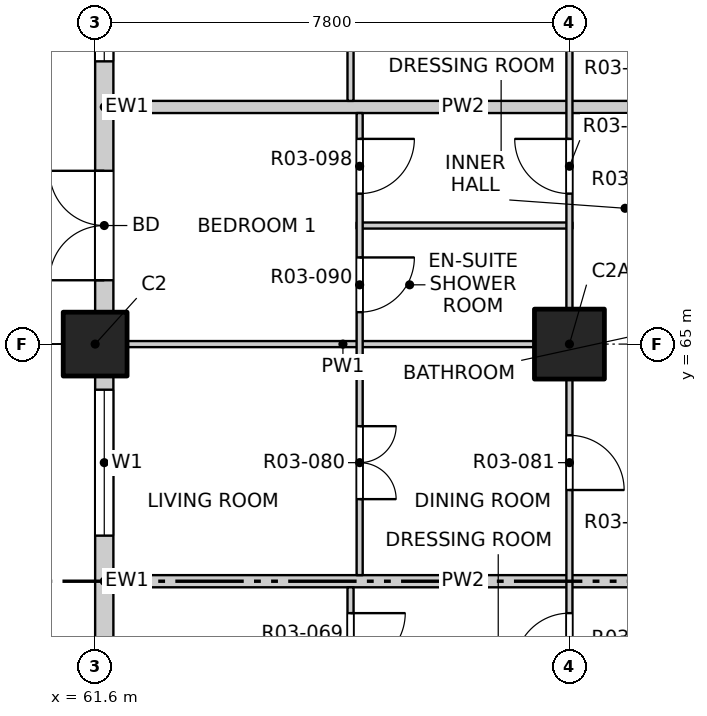
"""IFC4 building model, lengths in metres.
Left out: names, types, materials, properties, quantities, classifications, styles, units other than length and angle.
Written with IfcOpenShell. Run it as: python <this file> out.ifc"""

import sys

from ifc_helpers import new_model, si_unit, direction, frame, frame_2d, origin, origin_2d, place, context, subcontext, project, spatial, rectangle, extrude, element, fill, save


model = new_model("IFC4")
c1 = context("Model", 3, precision=1e-05, world=origin(), true_north=direction((0.0, 1.0)))
c2 = subcontext(c1, "Body", "Model", "MODEL_VIEW")
j1 = project(units=[si_unit("LENGTHUNIT", "METRE"), si_unit("PLANEANGLEUNIT", "RADIAN")], contexts=[c1])
p1 = place(None, origin())
s1 = spatial("IfcSite", under=j1, at=p1, CompositionType="ELEMENT")
p2 = place(p1, origin())
s2 = spatial("IfcBuilding", under=s1, at=p2, CompositionType="ELEMENT")
p3 = place(p2, frame((0.0, 0.0, 39.9)))
s3 = spatial("IfcBuildingStorey", under=s2, at=p3, CompositionType="ELEMENT", Elevation=39.9)
p4 = place(p3, frame((61.6, 65.0, -0.25), z_axis=(0.0, 0.0, 1.0), x_axis=(1.0, 0.0, 0.0)))
e1 = element("IfcColumn", 1, at=p4, inside=s3, PredefinedType="COLUMN", context=c2, shape_type="SweptSolid", body=[
    extrude(rectangle(XDim=1.05, YDim=1.05, at=origin_2d()), origin(), (0.0, 0.0, 1.0), 3.4),
])
p5 = place(p3, frame((69.4, 65.0, -0.25), z_axis=(0.0, 0.0, 1.0), x_axis=(1.0, 0.0, 0.0)))
e2 = element("IfcColumn", 2, at=p5, inside=s3, PredefinedType="COLUMN", context=c2, shape_type="SweptSolid", body=[
    extrude(rectangle(XDim=1.15, YDim=1.15, at=origin_2d()), origin(), (0.0, 0.0, 1.0), 3.4),
])
p6 = place(p3, frame((61.75, 57.725, 0.0), z_axis=(0.0, 0.0, 1.0), x_axis=(0.0, 1.0, 0.0)))
e3 = element("IfcWall", 3, at=p6, inside=s3, PredefinedType="SOLIDWALL", context=c2, shape_type="SweptSolid", body=[
    extrude(rectangle(XDim=6.75, YDim=0.3, at=frame_2d((3.375, 0.0))), origin(), (0.0, 0.0, 1.0), 2.7),
])
p7 = place(p6, frame((0.525, 0.0, 0.0)))
e4 = element("IfcOpeningElement", 4, at=p7, cuts=e3, PredefinedType="OPENING", context=c2, shape_type="SweptSolid", body=[
    extrude(rectangle(XDim=1.8, YDim=2.4, at=frame_2d((0.9, 1.2))), frame((0.0, 0.16, 0.0), z_axis=(0.0, -1.0, 0.0), x_axis=(1.0, 0.0, 0.0)), (0.0, 0.0, 1.0), 0.32),
])
p8 = place(p6, frame((4.125, 0.0, 0.9)))
e5 = element("IfcOpeningElement", 5, at=p8, cuts=e3, PredefinedType="OPENING", context=c2, shape_type="SweptSolid", body=[
    extrude(rectangle(XDim=2.4, YDim=1.8, at=frame_2d((1.2, 0.9))), frame((0.0, 0.16, 0.0), z_axis=(0.0, -1.0, 0.0), x_axis=(1.0, 0.0, 0.0)), (0.0, 0.0, 1.0), 0.32),
])
p9 = place(p3, frame((61.75, 65.525, 0.0), z_axis=(0.0, 0.0, 1.0), x_axis=(0.0, 1.0, 0.0)))
e6 = element("IfcWall", 6, at=p9, inside=s3, PredefinedType="SOLIDWALL", context=c2, shape_type="SweptSolid", body=[
    extrude(rectangle(XDim=6.75, YDim=0.3, at=frame_2d((3.375, 0.0))), origin(), (0.0, 0.0, 1.0), 2.7),
])
p10 = place(p9, frame((0.525, 0.0, 0.0)))
e7 = element("IfcOpeningElement", 7, at=p10, cuts=e6, PredefinedType="OPENING", context=c2, shape_type="SweptSolid", body=[
    extrude(rectangle(XDim=1.8, YDim=2.4, at=frame_2d((0.9, 1.2))), frame((0.0, 0.16, 0.0), z_axis=(0.0, -1.0, 0.0), x_axis=(1.0, 0.0, 0.0)), (0.0, 0.0, 1.0), 0.32),
])
p11 = place(p9, frame((4.125, 0.0, 0.9)))
e8 = element("IfcOpeningElement", 8, at=p11, cuts=e6, PredefinedType="OPENING", context=c2, shape_type="SweptSolid", body=[
    extrude(rectangle(XDim=2.4, YDim=1.8, at=frame_2d((1.2, 0.9))), frame((0.0, 0.16, 0.0), z_axis=(0.0, -1.0, 0.0), x_axis=(1.0, 0.0, 0.0)), (0.0, 0.0, 1.0), 0.32),
])
p12 = place(p3, frame((61.9, 61.1, 0.0), z_axis=(0.0, 0.0, 1.0), x_axis=(1.0, 0.0, 0.0)))
e9 = element("IfcWall", 9, at=p12, inside=s3, PredefinedType="PARTITIONING", context=c2, shape_type="SweptSolid", body=[
    extrude(rectangle(XDim=11.5, YDim=0.2, at=frame_2d((5.75, 0.0))), origin(), (0.0, 0.0, 1.0), 3.15),
])
p13 = place(p3, frame((61.9, 65.0, 0.0), z_axis=(0.0, 0.0, 1.0), x_axis=(1.0, 0.0, 0.0)))
e10 = element("IfcWall", 10, at=p13, inside=s3, PredefinedType="PARTITIONING", context=c2, shape_type="SweptSolid", body=[
    extrude(rectangle(XDim=7.55, YDim=0.1, at=frame_2d((3.775, 0.0))), origin(), (0.0, 0.0, 1.0), 2.55),
])
p14 = place(p3, frame((65.9, 66.95, 0.0), z_axis=(0.0, 0.0, 1.0), x_axis=(1.0, 0.0, 0.0)))
e11 = element("IfcWall", 11, at=p14, inside=s3, PredefinedType="PARTITIONING", context=c2, shape_type="SweptSolid", body=[
    extrude(rectangle(XDim=3.55, YDim=0.1, at=frame_2d((1.775, 0.0))), origin(), (0.0, 0.0, 1.0), 3.15),
])
p15 = place(p3, frame((61.9, 68.9, 0.0), z_axis=(0.0, 0.0, 1.0), x_axis=(1.0, 0.0, 0.0)))
e12 = element("IfcWall", 12, at=p15, inside=s3, PredefinedType="PARTITIONING", context=c2, shape_type="SweptSolid", body=[
    extrude(rectangle(XDim=11.5, YDim=0.2, at=frame_2d((5.75, 0.0))), origin(), (0.0, 0.0, 1.0), 3.15),
])
p16 = place(p3, frame((65.8, 41.9, 0.0), z_axis=(0.0, 0.0, 1.0), x_axis=(0.0, 1.0, 0.0)))
e13 = element("IfcWall", 13, at=p16, inside=s3, PredefinedType="PARTITIONING", context=c2, shape_type="SweptSolid", body=[
    extrude(rectangle(XDim=19.1, YDim=0.1, at=frame_2d((9.55, 0.0))), origin(), (0.0, 0.0, 1.0), 3.15),
])
p17 = place(p16, frame((1.05, 0.0, 0.0)))
e14 = element("IfcOpeningElement", 14, at=p17, cuts=e13, PredefinedType="OPENING", context=c2, shape_type="SweptSolid", body=[
    extrude(rectangle(XDim=1.2, YDim=2.1, at=frame_2d((0.6, 1.05))), frame((0.0, 0.06, 0.0), z_axis=(0.0, -1.0, 0.0), x_axis=(1.0, 0.0, 0.0)), (0.0, 0.0, 1.0), 0.12),
])
p18 = place(p16, frame((4.125, 0.0, 0.0)))
e15 = element("IfcOpeningElement", 15, at=p18, cuts=e13, PredefinedType="OPENING", context=c2, shape_type="SweptSolid", body=[
    extrude(rectangle(XDim=0.9, YDim=2.1, at=frame_2d((0.45, 1.05))), frame((0.0, 0.06, 0.0), z_axis=(0.0, -1.0, 0.0), x_axis=(1.0, 0.0, 0.0)), (0.0, 0.0, 1.0), 0.12),
])
p19 = place(p16, frame((6.075, 0.0, 0.0)))
e16 = element("IfcOpeningElement", 16, at=p19, cuts=e13, PredefinedType="OPENING", context=c2, shape_type="SweptSolid", body=[
    extrude(rectangle(XDim=0.9, YDim=2.1, at=frame_2d((0.45, 1.05))), frame((0.0, 0.06, 0.0), z_axis=(0.0, -1.0, 0.0), x_axis=(1.0, 0.0, 0.0)), (0.0, 0.0, 1.0), 0.12),
])
p20 = place(p16, frame((8.85, 0.0, 0.0)))
e17 = element("IfcOpeningElement", 17, at=p20, cuts=e13, PredefinedType="OPENING", context=c2, shape_type="SweptSolid", body=[
    extrude(rectangle(XDim=1.2, YDim=2.1, at=frame_2d((0.6, 1.05))), frame((0.0, 0.06, 0.0), z_axis=(0.0, -1.0, 0.0), x_axis=(1.0, 0.0, 0.0)), (0.0, 0.0, 1.0), 0.12),
])
p21 = place(p16, frame((11.925, 0.0, 0.0)))
e18 = element("IfcOpeningElement", 18, at=p21, cuts=e13, PredefinedType="OPENING", context=c2, shape_type="SweptSolid", body=[
    extrude(rectangle(XDim=0.9, YDim=2.1, at=frame_2d((0.45, 1.05))), frame((0.0, 0.06, 0.0), z_axis=(0.0, -1.0, 0.0), x_axis=(1.0, 0.0, 0.0)), (0.0, 0.0, 1.0), 0.12),
])
p22 = place(p16, frame((13.875, 0.0, 0.0)))
e19 = element("IfcOpeningElement", 19, at=p22, cuts=e13, PredefinedType="OPENING", context=c2, shape_type="SweptSolid", body=[
    extrude(rectangle(XDim=0.9, YDim=2.1, at=frame_2d((0.45, 1.05))), frame((0.0, 0.06, 0.0), z_axis=(0.0, -1.0, 0.0), x_axis=(1.0, 0.0, 0.0)), (0.0, 0.0, 1.0), 0.12),
])
p23 = place(p16, frame((15.825, 0.0, 0.0)))
e20 = element("IfcOpeningElement", 20, at=p23, cuts=e13, PredefinedType="OPENING", context=c2, shape_type="SweptSolid", body=[
    extrude(rectangle(XDim=0.9, YDim=2.1, at=frame_2d((0.45, 1.05))), frame((0.0, 0.06, 0.0), z_axis=(0.0, -1.0, 0.0), x_axis=(1.0, 0.0, 0.0)), (0.0, 0.0, 1.0), 0.12),
])
p24 = place(p16, frame((17.775, 0.0, 0.0)))
e21 = element("IfcOpeningElement", 21, at=p24, cuts=e13, PredefinedType="OPENING", context=c2, shape_type="SweptSolid", body=[
    extrude(rectangle(XDim=0.9, YDim=2.1, at=frame_2d((0.45, 1.05))), frame((0.0, 0.06, 0.0), z_axis=(0.0, -1.0, 0.0), x_axis=(1.0, 0.0, 0.0)), (0.0, 0.0, 1.0), 0.12),
])
p25 = place(p3, frame((65.8, 69.0, 0.0), z_axis=(0.0, 0.0, 1.0), x_axis=(0.0, 1.0, 0.0)))
e22 = element("IfcWall", 22, at=p25, inside=s3, PredefinedType="PARTITIONING", context=c2, shape_type="SweptSolid", body=[
    extrude(rectangle(XDim=7.6, YDim=0.1, at=frame_2d((3.8, 0.0))), origin(), (0.0, 0.0, 1.0), 3.15),
])
p26 = place(p25, frame((1.25, 0.0, 0.0)))
e23 = element("IfcOpeningElement", 23, at=p26, cuts=e22, PredefinedType="OPENING", context=c2, shape_type="SweptSolid", body=[
    extrude(rectangle(XDim=1.2, YDim=2.1, at=frame_2d((0.6, 1.05))), frame((0.0, 0.06, 0.0), z_axis=(0.0, -1.0, 0.0), x_axis=(1.0, 0.0, 0.0)), (0.0, 0.0, 1.0), 0.12),
])
p27 = place(p25, frame((4.325, 0.0, 0.0)))
e24 = element("IfcOpeningElement", 24, at=p27, cuts=e22, PredefinedType="OPENING", context=c2, shape_type="SweptSolid", body=[
    extrude(rectangle(XDim=0.9, YDim=2.1, at=frame_2d((0.45, 1.05))), frame((0.0, 0.06, 0.0), z_axis=(0.0, -1.0, 0.0), x_axis=(1.0, 0.0, 0.0)), (0.0, 0.0, 1.0), 0.12),
])
p28 = place(p25, frame((6.275, 0.0, 0.0)))
e25 = element("IfcOpeningElement", 25, at=p28, cuts=e22, PredefinedType="OPENING", context=c2, shape_type="SweptSolid", body=[
    extrude(rectangle(XDim=0.9, YDim=2.1, at=frame_2d((0.45, 1.05))), frame((0.0, 0.06, 0.0), z_axis=(0.0, -1.0, 0.0), x_axis=(1.0, 0.0, 0.0)), (0.0, 0.0, 1.0), 0.12),
])
p29 = place(p3, frame((65.95, 61.2, 0.0), z_axis=(0.0, 0.0, 1.0), x_axis=(0.0, 1.0, 0.0)))
e26 = element("IfcWall", 26, at=p29, inside=s3, PredefinedType="PARTITIONING", context=c2, shape_type="SweptSolid", body=[
    extrude(rectangle(XDim=7.6, YDim=0.1, at=frame_2d((3.8, 0.0))), origin(), (0.0, 0.0, 1.0), 3.15),
])
p30 = place(p29, frame((1.25, 0.0, 0.0)))
e27 = element("IfcOpeningElement", 27, at=p30, cuts=e26, PredefinedType="OPENING", context=c2, shape_type="SweptSolid", body=[
    extrude(rectangle(XDim=1.2, YDim=2.1, at=frame_2d((0.6, 1.05))), frame((0.0, 0.06, 0.0), z_axis=(0.0, -1.0, 0.0), x_axis=(1.0, 0.0, 0.0)), (0.0, 0.0, 1.0), 0.12),
])
p31 = place(p29, frame((4.325, 0.0, 0.0)))
e28 = element("IfcOpeningElement", 28, at=p31, cuts=e26, PredefinedType="OPENING", context=c2, shape_type="SweptSolid", body=[
    extrude(rectangle(XDim=0.9, YDim=2.1, at=frame_2d((0.45, 1.05))), frame((0.0, 0.06, 0.0), z_axis=(0.0, -1.0, 0.0), x_axis=(1.0, 0.0, 0.0)), (0.0, 0.0, 1.0), 0.12),
])
p32 = place(p29, frame((6.275, 0.0, 0.0)))
e29 = element("IfcOpeningElement", 29, at=p32, cuts=e26, PredefinedType="OPENING", context=c2, shape_type="SweptSolid", body=[
    extrude(rectangle(XDim=0.9, YDim=2.1, at=frame_2d((0.45, 1.05))), frame((0.0, 0.06, 0.0), z_axis=(0.0, -1.0, 0.0), x_axis=(1.0, 0.0, 0.0)), (0.0, 0.0, 1.0), 0.12),
])
p33 = place(p3, frame((69.4, 41.9, 0.0), z_axis=(0.0, 0.0, 1.0), x_axis=(0.0, 1.0, 0.0)))
e30 = element("IfcWall", 30, at=p33, inside=s3, PredefinedType="PARTITIONING", context=c2, shape_type="SweptSolid", body=[
    extrude(rectangle(XDim=46.2, YDim=0.1, at=frame_2d((23.1, 0.0))), origin(), (0.0, 0.0, 1.0), 3.15),
])
p34 = place(p33, frame((1.2, 0.0, 0.0)))
e31 = element("IfcOpeningElement", 31, at=p34, cuts=e30, PredefinedType="OPENING", context=c2, shape_type="SweptSolid", body=[
    extrude(rectangle(XDim=0.9, YDim=2.1, at=frame_2d((0.45, 1.05))), frame((0.0, 0.06, 0.0), z_axis=(0.0, -1.0, 0.0), x_axis=(1.0, 0.0, 0.0)), (0.0, 0.0, 1.0), 0.12),
])
p35 = place(p33, frame((5.9, 0.0, 0.0)))
e32 = element("IfcOpeningElement", 32, at=p35, cuts=e30, PredefinedType="OPENING", context=c2, shape_type="SweptSolid", body=[
    extrude(rectangle(XDim=0.9, YDim=2.1, at=frame_2d((0.45, 1.05))), frame((0.0, 0.06, 0.0), z_axis=(0.0, -1.0, 0.0), x_axis=(1.0, 0.0, 0.0)), (0.0, 0.0, 1.0), 0.12),
])
p36 = place(p33, frame((9.0, 0.0, 0.0)))
e33 = element("IfcOpeningElement", 33, at=p36, cuts=e30, PredefinedType="OPENING", context=c2, shape_type="SweptSolid", body=[
    extrude(rectangle(XDim=0.9, YDim=2.1, at=frame_2d((0.45, 1.05))), frame((0.0, 0.06, 0.0), z_axis=(0.0, -1.0, 0.0), x_axis=(1.0, 0.0, 0.0)), (0.0, 0.0, 1.0), 0.12),
])
p37 = place(p33, frame((13.725, 0.0, 0.0)))
e34 = element("IfcOpeningElement", 34, at=p37, cuts=e30, PredefinedType="OPENING", context=c2, shape_type="SweptSolid", body=[
    extrude(rectangle(XDim=0.9, YDim=2.1, at=frame_2d((0.45, 1.05))), frame((0.0, 0.06, 0.0), z_axis=(0.0, -1.0, 0.0), x_axis=(1.0, 0.0, 0.0)), (0.0, 0.0, 1.0), 0.12),
])
p38 = place(p33, frame((17.775, 0.0, 0.0)))
e35 = element("IfcOpeningElement", 35, at=p38, cuts=e30, PredefinedType="OPENING", context=c2, shape_type="SweptSolid", body=[
    extrude(rectangle(XDim=0.9, YDim=2.1, at=frame_2d((0.45, 1.05))), frame((0.0, 0.06, 0.0), z_axis=(0.0, -1.0, 0.0), x_axis=(1.0, 0.0, 0.0)), (0.0, 0.0, 1.0), 0.12),
])
p39 = place(p33, frame((20.7, 0.0, 0.0)))
e36 = element("IfcOpeningElement", 36, at=p39, cuts=e30, PredefinedType="OPENING", context=c2, shape_type="SweptSolid", body=[
    extrude(rectangle(XDim=0.9, YDim=2.1, at=frame_2d((0.45, 1.05))), frame((0.0, 0.06, 0.0), z_axis=(0.0, -1.0, 0.0), x_axis=(1.0, 0.0, 0.0)), (0.0, 0.0, 1.0), 0.12),
])
p40 = place(p33, frame((25.575, 0.0, 0.0)))
e37 = element("IfcOpeningElement", 37, at=p40, cuts=e30, PredefinedType="OPENING", context=c2, shape_type="SweptSolid", body=[
    extrude(rectangle(XDim=0.9, YDim=2.1, at=frame_2d((0.45, 1.05))), frame((0.0, 0.06, 0.0), z_axis=(0.0, -1.0, 0.0), x_axis=(1.0, 0.0, 0.0)), (0.0, 0.0, 1.0), 0.12),
])
p41 = place(p33, frame((28.5, 0.0, 0.0)))
e38 = element("IfcOpeningElement", 38, at=p41, cuts=e30, PredefinedType="OPENING", context=c2, shape_type="SweptSolid", body=[
    extrude(rectangle(XDim=0.9, YDim=2.1, at=frame_2d((0.45, 1.05))), frame((0.0, 0.06, 0.0), z_axis=(0.0, -1.0, 0.0), x_axis=(1.0, 0.0, 0.0)), (0.0, 0.0, 1.0), 0.12),
])
p42 = place(p33, frame((33.375, 0.0, 0.0)))
e39 = element("IfcOpeningElement", 39, at=p42, cuts=e30, PredefinedType="OPENING", context=c2, shape_type="SweptSolid", body=[
    extrude(rectangle(XDim=0.9, YDim=2.1, at=frame_2d((0.45, 1.05))), frame((0.0, 0.06, 0.0), z_axis=(0.0, -1.0, 0.0), x_axis=(1.0, 0.0, 0.0)), (0.0, 0.0, 1.0), 0.12),
])
p43 = place(p33, frame((36.3, 0.0, 0.0)))
e40 = element("IfcOpeningElement", 40, at=p43, cuts=e30, PredefinedType="OPENING", context=c2, shape_type="SweptSolid", body=[
    extrude(rectangle(XDim=0.9, YDim=2.1, at=frame_2d((0.45, 1.05))), frame((0.0, 0.06, 0.0), z_axis=(0.0, -1.0, 0.0), x_axis=(1.0, 0.0, 0.0)), (0.0, 0.0, 1.0), 0.12),
])
p44 = place(p33, frame((40.2, 0.0, 0.0)))
e41 = element("IfcOpeningElement", 41, at=p44, cuts=e30, PredefinedType="OPENING", context=c2, shape_type="SweptSolid", body=[
    extrude(rectangle(XDim=0.9, YDim=2.1, at=frame_2d((0.45, 1.05))), frame((0.0, 0.06, 0.0), z_axis=(0.0, -1.0, 0.0), x_axis=(1.0, 0.0, 0.0)), (0.0, 0.0, 1.0), 0.12),
])
p45 = place(p33, frame((44.1, 0.0, 0.0)))
e42 = element("IfcOpeningElement", 42, at=p45, cuts=e30, PredefinedType="OPENING", context=c2, shape_type="SweptSolid", body=[
    extrude(rectangle(XDim=0.9, YDim=2.1, at=frame_2d((0.45, 1.05))), frame((0.0, 0.06, 0.0), z_axis=(0.0, -1.0, 0.0), x_axis=(1.0, 0.0, 0.0)), (0.0, 0.0, 1.0), 0.12),
])
p46 = place(p8, origin())
e43 = element("IfcWindow", 43, at=p46, inside=s3, PartitioningType="DOUBLE_PANEL_VERTICAL", PredefinedType="WINDOW", context=c2, shape_type="SweptSolid", body=[
    extrude(rectangle(XDim=2.4, YDim=1.8, at=frame_2d((1.2, 0.9))), frame((0.0, 0.03, 0.0), z_axis=(0.0, -1.0, 0.0), x_axis=(1.0, 0.0, 0.0)), (0.0, 0.0, 1.0), 0.06),
])
fill(e5, e43)
p47 = place(p10, origin())
e44 = element("IfcDoor", 44, at=p47, inside=s3, OperationType="DOUBLE_DOOR_SINGLE_SWING", PredefinedType="DOOR", context=c2, shape_type="SweptSolid", body=[
    extrude(rectangle(XDim=1.8, YDim=2.4, at=frame_2d((0.9, 1.2))), frame((0.0, 0.025, 0.0), z_axis=(0.0, -1.0, 0.0), x_axis=(1.0, 0.0, 0.0)), (0.0, 0.0, 1.0), 0.05),
])
fill(e7, e44)
p48 = place(p11, origin())
e45 = element("IfcWindow", 45, at=p48, inside=s3, PartitioningType="DOUBLE_PANEL_VERTICAL", PredefinedType="WINDOW", context=c2, shape_type="SweptSolid", body=[
    extrude(rectangle(XDim=2.4, YDim=1.8, at=frame_2d((1.2, 0.9))), frame((0.0, 0.03, 0.0), z_axis=(0.0, -1.0, 0.0), x_axis=(1.0, 0.0, 0.0)), (0.0, 0.0, 1.0), 0.06),
])
fill(e8, e45)
p49 = place(p24, origin())
e46 = element("IfcDoor", 46, at=p49, inside=s3, OperationType="SINGLE_SWING_LEFT", PredefinedType="DOOR", context=c2, shape_type="SweptSolid", body=[
    extrude(rectangle(XDim=0.9, YDim=2.1, at=frame_2d((0.45, 1.05))), frame((0.0, 0.025, 0.0), z_axis=(0.0, -1.0, 0.0), x_axis=(1.0, 0.0, 0.0)), (0.0, 0.0, 1.0), 0.05),
])
fill(e21, e46)
p50 = place(p38, origin())
e47 = element("IfcDoor", 47, at=p50, inside=s3, OperationType="SINGLE_SWING_LEFT", PredefinedType="DOOR", context=c2, shape_type="SweptSolid", body=[
    extrude(rectangle(XDim=0.9, YDim=2.1, at=frame_2d((0.45, 1.05))), frame((0.0, 0.025, 0.0), z_axis=(0.0, -1.0, 0.0), x_axis=(1.0, 0.0, 0.0)), (0.0, 0.0, 1.0), 0.05),
])
fill(e35, e47)
p51 = place(p30, origin())
e48 = element("IfcDoor", 48, at=p51, inside=s3, OperationType="DOUBLE_DOOR_SINGLE_SWING", PredefinedType="DOOR", context=c2, shape_type="SweptSolid", body=[
    extrude(rectangle(XDim=1.2, YDim=2.1, at=frame_2d((0.6, 1.05))), frame((0.0, 0.025, 0.0), z_axis=(0.0, -1.0, 0.0), x_axis=(1.0, 0.0, 0.0)), (0.0, 0.0, 1.0), 0.05),
])
fill(e27, e48)
p52 = place(p39, origin())
e49 = element("IfcDoor", 49, at=p52, inside=s3, OperationType="SINGLE_SWING_RIGHT", PredefinedType="DOOR", context=c2, shape_type="SweptSolid", body=[
    extrude(rectangle(XDim=0.9, YDim=2.1, at=frame_2d((0.45, 1.05))), frame((0.0, 0.025, 0.0), z_axis=(0.0, -1.0, 0.0), x_axis=(1.0, 0.0, 0.0)), (0.0, 0.0, 1.0), 0.05),
])
fill(e36, e49)
p53 = place(p31, origin())
e50 = element("IfcDoor", 50, at=p53, inside=s3, OperationType="SINGLE_SWING_LEFT", PredefinedType="DOOR", context=c2, shape_type="SweptSolid", body=[
    extrude(rectangle(XDim=0.9, YDim=2.1, at=frame_2d((0.45, 1.05))), frame((0.0, 0.025, 0.0), z_axis=(0.0, -1.0, 0.0), x_axis=(1.0, 0.0, 0.0)), (0.0, 0.0, 1.0), 0.05),
])
fill(e28, e50)
p54 = place(p32, origin())
e51 = element("IfcDoor", 51, at=p54, inside=s3, OperationType="SINGLE_SWING_LEFT", PredefinedType="DOOR", context=c2, shape_type="SweptSolid", body=[
    extrude(rectangle(XDim=0.9, YDim=2.1, at=frame_2d((0.45, 1.05))), frame((0.0, 0.025, 0.0), z_axis=(0.0, -1.0, 0.0), x_axis=(1.0, 0.0, 0.0)), (0.0, 0.0, 1.0), 0.05),
])
fill(e29, e51)
p55 = place(p40, origin())
e52 = element("IfcDoor", 52, at=p55, inside=s3, OperationType="SINGLE_SWING_RIGHT", PredefinedType="DOOR", context=c2, shape_type="SweptSolid", body=[
    extrude(rectangle(XDim=0.9, YDim=2.1, at=frame_2d((0.45, 1.05))), frame((0.0, 0.025, 0.0), z_axis=(0.0, -1.0, 0.0), x_axis=(1.0, 0.0, 0.0)), (0.0, 0.0, 1.0), 0.05),
])
fill(e37, e52)
save(model, sys.argv[1])
